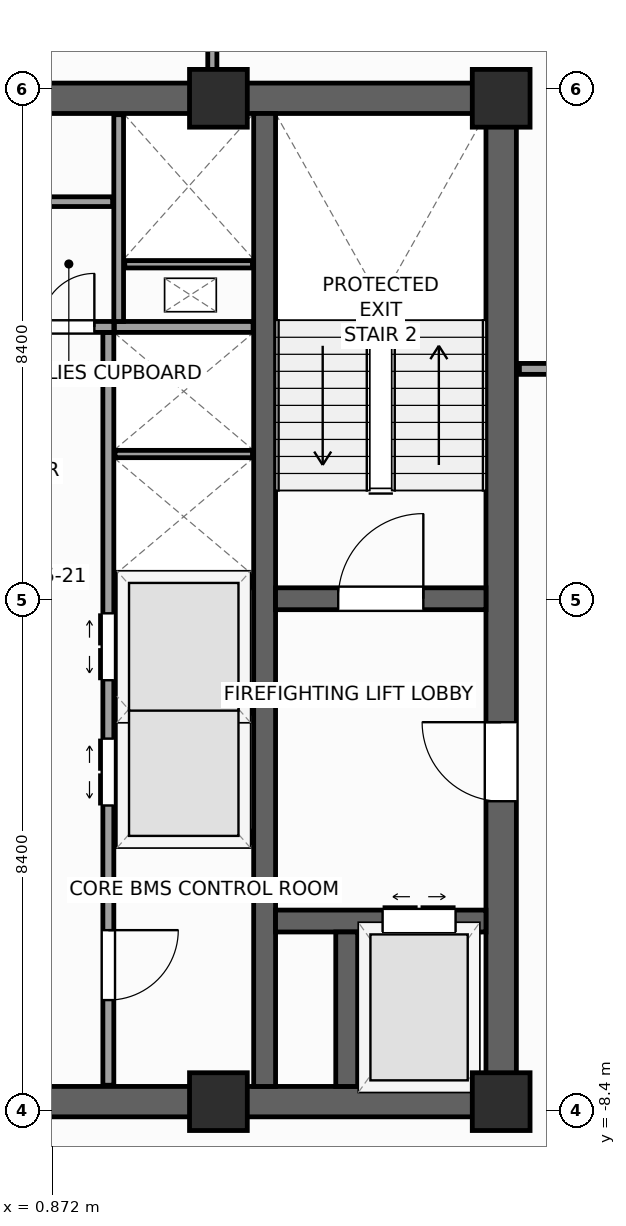
"""IFC4 building model, lengths in metres.
Left out: names, types, materials, properties, quantities, classifications, styles, units other than length and angle.
Written with IfcOpenShell. Run it as: python <this file> out.ifc"""

import sys

from ifc_helpers import new_model, si_unit, direction, frame, frame_2d, origin, origin_2d, place, context, subcontext, project, spatial, rectangle, extrude, source, transform, mapped, element, fill, save


model = new_model("IFC4")
c1 = context("Model", 3, precision=1e-05, world=origin(), true_north=direction((0.0, 1.0)))
c2 = subcontext(c1, "Body", "Model", "MODEL_VIEW")
j1 = project(units=[si_unit("LENGTHUNIT", "METRE"), si_unit("PLANEANGLEUNIT", "RADIAN")], contexts=[c1])
p1 = place(None, origin())
s1 = spatial("IfcSite", under=j1, at=p1, CompositionType="ELEMENT")
p2 = place(p1, origin())
s2 = spatial("IfcBuilding", under=s1, at=p2, CompositionType="ELEMENT")
p3 = place(p2, frame((0.0, 0.0, 225.1)))
s3 = spatial("IfcBuildingStorey", under=s2, at=p3, CompositionType="ELEMENT", Elevation=225.1)
p4 = place(p3, frame((-8.5, -8.25, 0.0), z_axis=(0.0, 0.0, 1.0), x_axis=(1.0, 0.0, 0.0)))
e1 = element("IfcWall", 1, at=p4, inside=s3, PredefinedType="SHEAR", context=c2, shape_type="SweptSolid", body=[
    extrude(rectangle(XDim=17.0, YDim=0.5, at=frame_2d((8.5, 0.0))), origin(), (0.0, 0.0, 1.0), 3.9),
])
p5 = place(p4, frame((7.85, 0.0, 0.0)))
e2 = element("IfcOpeningElement", 2, at=p5, cuts=e1, PredefinedType="OPENING", context=c2, shape_type="SweptSolid", body=[
    extrude(rectangle(XDim=1.3, YDim=2.2, at=frame_2d((0.65, 1.1))), frame((0.0, 0.26, 0.0), z_axis=(0.0, -1.0, 0.0), x_axis=(1.0, 0.0, 0.0)), (0.0, 0.0, 1.0), 0.52),
])
p6 = place(p3, frame((-8.5, 8.25, 0.0), z_axis=(0.0, 0.0, 1.0), x_axis=(1.0, 0.0, 0.0)))
e3 = element("IfcWall", 3, at=p6, inside=s3, PredefinedType="SHEAR", context=c2, shape_type="SweptSolid", body=[
    extrude(rectangle(XDim=17.0, YDim=0.5, at=frame_2d((8.5, 0.0))), origin(), (0.0, 0.0, 1.0), 3.9),
])
p7 = place(p3, frame((8.25, -8.0, 0.0), z_axis=(0.0, 0.0, 1.0), x_axis=(0.0, 1.0, 0.0)))
e4 = element("IfcWall", 4, at=p7, inside=s3, PredefinedType="SHEAR", context=c2, shape_type="SweptSolid", body=[
    extrude(rectangle(XDim=16.0, YDim=0.5, at=frame_2d((8.0, 0.0))), origin(), (0.0, 0.0, 1.0), 3.9),
])
p8 = place(p7, frame((4.69, 0.0, 0.0)))
e5 = element("IfcOpeningElement", 5, at=p8, cuts=e4, PredefinedType="OPENING", context=c2, shape_type="SweptSolid", body=[
    extrude(rectangle(XDim=1.3, YDim=2.2, at=frame_2d((0.65, 1.1))), frame((0.0, 0.26, 0.0), z_axis=(0.0, -1.0, 0.0), x_axis=(1.0, 0.0, 0.0)), (0.0, 0.0, 1.0), 0.52),
])
p9 = place(p3, frame((4.36, -8.0, 0.0), z_axis=(0.0, 0.0, 1.0), x_axis=(0.0, 1.0, 0.0)))
e6 = element("IfcWall", 6, at=p9, inside=s3, PredefinedType="SHEAR", context=c2, shape_type="SweptSolid", body=[
    extrude(rectangle(XDim=16.0, YDim=0.36, at=frame_2d((8.0, 0.0))), origin(), (0.0, 0.0, 1.0), 3.9),
])
p10 = place(p3, frame((4.54, 0.02, 0.0), z_axis=(0.0, 0.0, 1.0), x_axis=(1.0, 0.0, 0.0)))
e7 = element("IfcWall", 7, at=p10, inside=s3, PredefinedType="SHEAR", context=c2, shape_type="SweptSolid", body=[
    extrude(rectangle(XDim=3.46, YDim=0.36, at=frame_2d((1.73, 0.0))), origin(), (0.0, 0.0, 1.0), 3.9),
])
p11 = place(p10, frame((1.03, 0.0, 0.0)))
e8 = element("IfcOpeningElement", 8, at=p11, cuts=e7, PredefinedType="OPENING", context=c2, shape_type="SweptSolid", body=[
    extrude(rectangle(XDim=1.4, YDim=2.2, at=frame_2d((0.7, 1.1))), frame((0.0, 0.19, 0.0), z_axis=(0.0, -1.0, 0.0), x_axis=(1.0, 0.0, 0.0)), (0.0, 0.0, 1.0), 0.38),
])
p12 = place(p3, frame((4.54, -5.28, 0.0), z_axis=(0.0, 0.0, 1.0), x_axis=(1.0, 0.0, 0.0)))
e9 = element("IfcWall", 9, at=p12, inside=s3, PredefinedType="SHEAR", context=c2, shape_type="SweptSolid", body=[
    extrude(rectangle(XDim=3.46, YDim=0.36, at=frame_2d((1.73, 0.0))), origin(), (0.0, 0.0, 1.0), 3.9),
])
p13 = place(p12, frame((1.76, 0.0, 0.0)))
e10 = element("IfcOpeningElement", 10, at=p13, cuts=e9, PredefinedType="OPENING", context=c2, shape_type="SweptSolid", body=[
    extrude(rectangle(XDim=1.2, YDim=2.25, at=frame_2d((0.6, 1.125))), frame((0.0, 0.19, 0.0), z_axis=(0.0, -1.0, 0.0), x_axis=(1.0, 0.0, 0.0)), (0.0, 0.0, 1.0), 0.38),
])
p14 = place(p3, frame((5.71, -8.0, 0.0), z_axis=(0.0, 0.0, 1.0), x_axis=(0.0, 1.0, 0.0)))
e11 = element("IfcWall", 11, at=p14, inside=s3, PredefinedType="SHEAR", context=c2, shape_type="SweptSolid", body=[
    extrude(rectangle(XDim=2.54, YDim=0.36, at=frame_2d((1.27, 0.0))), origin(), (0.0, 0.0, 1.0), 3.9),
])
m1 = source(origin(), c2, "Body", "SweptSolid", [
    extrude(rectangle(XDim=0.95, YDim=0.95, at=origin_2d()), origin(), (0.0, 0.0, 1.0), 3.9),
])
for number, where, z_axis, x_axis in (
    (12, (8.25, -8.25, 0.0), (0.0, 0.0, 1.0), (1.0, 0.0, 0.0)),
    (13, (8.25, 8.25, 0.0), (0.0, 0.0, 1.0), (1.0, 0.0, 0.0)),
    (14, (3.6, -8.25, 0.0), (0.0, 0.0, 1.0), (1.0, 0.0, 0.0)),
    (15, (3.6, 8.25, 0.0), (0.0, 0.0, 1.0), (1.0, 0.0, 0.0)),
):
    element("IfcColumn", number, at=place(p3, frame(where, z_axis=z_axis, x_axis=x_axis)), inside=s3, PredefinedType="PILASTER", context=c2, shape_type="MappedRepresentation", body=[
        mapped(m1, transform((0.0, 0.0, 0.0), scale=1.0)),
    ])
p15 = place(p3, frame((6.733, -29.154, 0.0), z_axis=(0.0, 0.0, 1.0), x_axis=(0.629325378072, 0.77714192302, 0.0)))
e16 = element("IfcWall", 16, at=p15, inside=s3, PredefinedType="STANDARD", context=c2, shape_type="SweptSolid", body=[
    extrude(rectangle(XDim=36.84, YDim=0.34, at=frame_2d((18.42, 0.0))), origin(), (0.0, 0.0, 1.0), 2.96),
])
p16 = place(p15, frame((12.295, 0.0, 0.0)))
e17 = element("IfcOpeningElement", 17, at=p16, cuts=e16, PredefinedType="OPENING", context=c2, shape_type="SweptSolid", body=[
    extrude(rectangle(XDim=1.05, YDim=2.25, at=frame_2d((0.525, 1.125))), frame((0.0, 0.18, 0.0), z_axis=(0.0, -1.0, 0.0), x_axis=(1.0, 0.0, 0.0)), (0.0, 0.0, 1.0), 0.36),
])
p17 = place(p15, frame((3.721, 0.0, 0.48)))
e18 = element("IfcOpeningElement", 18, at=p17, cuts=e16, PredefinedType="OPENING", context=c2, shape_type="SweptSolid", body=[
    extrude(rectangle(XDim=1.4, YDim=2.4, at=frame_2d((0.7, 1.2))), frame((0.0, 0.18, 0.0), z_axis=(0.0, -1.0, 0.0), x_axis=(1.0, 0.0, 0.0)), (0.0, 0.0, 1.0), 0.36),
])
p18 = place(p15, frame((16.058, 0.0, 0.58)))
e19 = element("IfcOpeningElement", 19, at=p18, cuts=e16, PredefinedType="OPENING", context=c2, shape_type="SweptSolid", body=[
    extrude(rectangle(XDim=1.75, YDim=2.3, at=frame_2d((0.875, 1.15))), frame((0.0, 0.18, 0.0), z_axis=(0.0, -1.0, 0.0), x_axis=(1.0, 0.0, 0.0)), (0.0, 0.0, 1.0), 0.36),
])
p19 = place(p15, frame((24.176, 0.0, 0.58)))
e20 = element("IfcOpeningElement", 20, at=p19, cuts=e16, PredefinedType="OPENING", context=c2, shape_type="SweptSolid", body=[
    extrude(rectangle(XDim=1.75, YDim=2.3, at=frame_2d((0.875, 1.15))), frame((0.0, 0.18, 0.0), z_axis=(0.0, -1.0, 0.0), x_axis=(1.0, 0.0, 0.0)), (0.0, 0.0, 1.0), 0.36),
])
p20 = place(p15, frame((30.982, 0.0, 0.48)))
e21 = element("IfcOpeningElement", 21, at=p20, cuts=e16, PredefinedType="OPENING", context=c2, shape_type="SweptSolid", body=[
    extrude(rectangle(XDim=1.4, YDim=2.4, at=frame_2d((0.7, 1.2))), frame((0.0, 0.18, 0.0), z_axis=(0.0, -1.0, 0.0), x_axis=(1.0, 0.0, 0.0)), (0.0, 0.0, 1.0), 0.36),
])
p21 = place(p3, frame((29.154, 6.733, 0.0), z_axis=(0.0, 0.0, 1.0), x_axis=(-0.77714192302, 0.629325378072, 0.0)))
e22 = element("IfcWall", 22, at=p21, inside=s3, PredefinedType="STANDARD", context=c2, shape_type="SweptSolid", body=[
    extrude(rectangle(XDim=36.84, YDim=0.34, at=frame_2d((18.42, 0.0))), origin(), (0.0, 0.0, 1.0), 2.96),
])
p22 = place(p21, frame((3.721, 0.0, 0.48)))
e23 = element("IfcOpeningElement", 23, at=p22, cuts=e22, PredefinedType="OPENING", context=c2, shape_type="SweptSolid", body=[
    extrude(rectangle(XDim=1.4, YDim=2.4, at=frame_2d((0.7, 1.2))), frame((0.0, 0.18, 0.0), z_axis=(0.0, -1.0, 0.0), x_axis=(1.0, 0.0, 0.0)), (0.0, 0.0, 1.0), 0.36),
])
p23 = place(p21, frame((9.809, 0.0, 0.58)))
e24 = element("IfcOpeningElement", 24, at=p23, cuts=e22, PredefinedType="OPENING", context=c2, shape_type="SweptSolid", body=[
    extrude(rectangle(XDim=1.75, YDim=2.3, at=frame_2d((0.875, 1.15))), frame((0.0, 0.18, 0.0), z_axis=(0.0, -1.0, 0.0), x_axis=(1.0, 0.0, 0.0)), (0.0, 0.0, 1.0), 0.36),
])
p24 = place(p21, frame((16.058, 0.0, 0.58)))
e25 = element("IfcOpeningElement", 25, at=p24, cuts=e22, PredefinedType="OPENING", context=c2, shape_type="SweptSolid", body=[
    extrude(rectangle(XDim=1.75, YDim=2.3, at=frame_2d((0.875, 1.15))), frame((0.0, 0.18, 0.0), z_axis=(0.0, -1.0, 0.0), x_axis=(1.0, 0.0, 0.0)), (0.0, 0.0, 1.0), 0.36),
])
p25 = place(p21, frame((24.176, 0.0, 0.58)))
e26 = element("IfcOpeningElement", 26, at=p25, cuts=e22, PredefinedType="OPENING", context=c2, shape_type="SweptSolid", body=[
    extrude(rectangle(XDim=1.75, YDim=2.3, at=frame_2d((0.875, 1.15))), frame((0.0, 0.18, 0.0), z_axis=(0.0, -1.0, 0.0), x_axis=(1.0, 0.0, 0.0)), (0.0, 0.0, 1.0), 0.36),
])
p26 = place(p21, frame((30.982, 0.0, 0.48)))
e27 = element("IfcOpeningElement", 27, at=p26, cuts=e22, PredefinedType="OPENING", context=c2, shape_type="SweptSolid", body=[
    extrude(rectangle(XDim=1.4, YDim=2.4, at=frame_2d((0.7, 1.2))), frame((0.0, 0.18, 0.0), z_axis=(0.0, -1.0, 0.0), x_axis=(1.0, 0.0, 0.0)), (0.0, 0.0, 1.0), 0.36),
])
p27 = place(p3, frame((1.79, -7.98, 0.0), z_axis=(0.0, 0.0, 1.0), x_axis=(0.0, 1.0, 0.0)))
e28 = element("IfcWall", 28, at=p27, inside=s3, PredefinedType="PARTITIONING", context=c2, shape_type="SweptSolid", body=[
    extrude(rectangle(XDim=12.38, YDim=0.18, at=frame_2d((6.19, 0.0))), origin(), (0.0, 0.0, 1.0), 3.66),
])
p28 = place(p27, frame((4.6, 0.0, 0.0)))
e29 = element("IfcOpeningElement", 29, at=p28, cuts=e28, PredefinedType="OPENING", context=c2, shape_type="SweptSolid", body=[
    extrude(rectangle(XDim=1.1, YDim=2.2, at=frame_2d((0.55, 1.1))), frame((0.0, 0.1, 0.0), z_axis=(0.0, -1.0, 0.0), x_axis=(1.0, 0.0, 0.0)), (0.0, 0.0, 1.0), 0.2),
])
p29 = place(p27, frame((6.66, 0.0, 0.0)))
e30 = element("IfcOpeningElement", 30, at=p29, cuts=e28, PredefinedType="OPENING", context=c2, shape_type="SweptSolid", body=[
    extrude(rectangle(XDim=1.1, YDim=2.2, at=frame_2d((0.55, 1.1))), frame((0.0, 0.1, 0.0), z_axis=(0.0, -1.0, 0.0), x_axis=(1.0, 0.0, 0.0)), (0.0, 0.0, 1.0), 0.2),
])
p30 = place(p27, frame((1.4, 0.0, 0.0)))
e31 = element("IfcOpeningElement", 31, at=p30, cuts=e28, PredefinedType="OPENING", context=c2, shape_type="SweptSolid", body=[
    extrude(rectangle(XDim=1.15, YDim=2.25, at=frame_2d((0.575, 1.125))), frame((0.0, 0.1, 0.0), z_axis=(0.0, -1.0, 0.0), x_axis=(1.0, 0.0, 0.0)), (0.0, 0.0, 1.0), 0.2),
])
p31 = place(p3, frame((-1.88, 4.49, 0.0), z_axis=(0.0, 0.0, 1.0), x_axis=(1.0, 0.0, 0.0)))
e32 = element("IfcWall", 32, at=p31, inside=s3, PredefinedType="PARTITIONING", context=c2, shape_type="SweptSolid", body=[
    extrude(rectangle(XDim=3.76, YDim=0.18, at=frame_2d((1.88, 0.0))), origin(), (0.0, 0.0, 1.0), 3.66),
])
p32 = place(p31, frame((0.55, 0.0, 0.0)))
e33 = element("IfcOpeningElement", 33, at=p32, cuts=e32, PredefinedType="OPENING", context=c2, shape_type="SweptSolid", body=[
    extrude(rectangle(XDim=0.95, YDim=2.1, at=frame_2d((0.475, 1.05))), frame((0.0, 0.1, 0.0), z_axis=(0.0, -1.0, 0.0), x_axis=(1.0, 0.0, 0.0)), (0.0, 0.0, 1.0), 0.2),
])
p33 = place(p31, frame((2.56, 0.0, 0.0)))
e34 = element("IfcOpeningElement", 34, at=p33, cuts=e32, PredefinedType="OPENING", context=c2, shape_type="SweptSolid", body=[
    extrude(rectangle(XDim=0.88, YDim=2.1, at=frame_2d((0.44, 1.05))), frame((0.0, 0.1, 0.0), z_axis=(0.0, -1.0, 0.0), x_axis=(1.0, 0.0, 0.0)), (0.0, 0.0, 1.0), 0.2),
])
for number, where, z_axis, x_axis in (
    (35, (1.89, -3.9, 0.0), (0.0, 0.0, 1.0), (1.0, 0.0, 0.0)),
    (36, (1.89, 0.3, 0.0), (0.0, 0.0, 1.0), (1.0, 0.0, 0.0)),
    (37, (1.89, 4.49, 0.0), (0.0, 0.0, 1.0), (1.0, 0.0, 0.0)),
):
    element("IfcWall", number, at=place(p3, frame(where, z_axis=z_axis, x_axis=x_axis)), inside=s3, PredefinedType="PARTITIONING", context=c2, shape_type="SweptSolid", body=[
        extrude(rectangle(XDim=2.28, YDim=0.18, at=frame_2d((1.14, 0.0))), origin(), (0.0, 0.0, 1.0), 3.66),
    ])
for number, where, z_axis, x_axis in (
    (38, (1.9, -1.8, 0.0), (0.0, 0.0, 1.0), (1.0, 0.0, 0.0)),
    (39, (1.9, 2.4, 0.0), (0.0, 0.0, 1.0), (1.0, 0.0, 0.0)),
):
    element("IfcWall", number, at=place(p3, frame(where, z_axis=z_axis, x_axis=x_axis)), inside=s3, PredefinedType="PARTITIONING", context=c2, shape_type="SweptSolid", body=[
        extrude(rectangle(XDim=2.26, YDim=0.12, at=frame_2d((1.13, 0.0))), origin(), (0.0, 0.0, 1.0), 3.66),
    ])
p34 = place(p3, frame((1.96, 4.58, 0.0), z_axis=(0.0, 0.0, 1.0), x_axis=(0.0, 1.0, 0.0)))
e40 = element("IfcWall", 40, at=p34, inside=s3, PredefinedType="PARTITIONING", context=c2, shape_type="SweptSolid", body=[
    extrude(rectangle(XDim=3.4, YDim=0.16, at=frame_2d((1.7, 0.0))), origin(), (0.0, 0.0, 1.0), 3.66),
])
p35 = place(p3, frame((2.06, 5.52, 0.0), z_axis=(0.0, 0.0, 1.0), x_axis=(1.0, 0.0, 0.0)))
e41 = element("IfcWall", 41, at=p35, inside=s3, PredefinedType="PARTITIONING", context=c2, shape_type="SweptSolid", body=[
    extrude(rectangle(XDim=2.1, YDim=0.12, at=frame_2d((1.05, 0.0))), origin(), (0.0, 0.0, 1.0), 3.66),
])
p36 = place(p3, frame((0.4, 6.55, 0.0), z_axis=(0.0, 0.0, 1.0), x_axis=(1.0, 0.0, 0.0)))
e42 = element("IfcWall", 42, at=p36, inside=s3, PredefinedType="PARTITIONING", context=c2, shape_type="SweptSolid", body=[
    extrude(rectangle(XDim=1.46, YDim=0.16, at=frame_2d((0.73, 0.0))), origin(), (0.0, 0.0, 1.0), 3.66),
])
p37 = place(p3, frame((8.55, 3.8, 0.0), z_axis=(0.0, 0.0, 1.0), x_axis=(1.0, 0.0, 0.0)))
e43 = element("IfcWall", 43, at=p37, inside=s3, PredefinedType="PARTITIONING", context=c2, shape_type="SweptSolid", body=[
    extrude(rectangle(XDim=3.9, YDim=0.18, at=frame_2d((1.95, 0.0))), origin(), (0.0, 0.0, 1.0), 3.66),
])
p38 = place(p37, frame((1.4, 0.0, 0.0)))
e44 = element("IfcOpeningElement", 44, at=p38, cuts=e43, PredefinedType="OPENING", context=c2, shape_type="SweptSolid", body=[
    extrude(rectangle(XDim=1.1, YDim=2.2, at=frame_2d((0.55, 1.1))), frame((0.0, 0.1, 0.0), z_axis=(0.0, -1.0, 0.0), x_axis=(1.0, 0.0, 0.0)), (0.0, 0.0, 1.0), 0.2),
])
p39 = place(p3, frame((3.5, 8.505, 0.0), z_axis=(0.0, 0.0, 1.0), x_axis=(0.0, 1.0, 0.0)))
e45 = element("IfcWall", 45, at=p39, inside=s3, PredefinedType="PARTITIONING", context=c2, shape_type="SweptSolid", body=[
    extrude(rectangle(XDim=18.868, YDim=0.15, at=frame_2d((9.434, 0.0))), origin(), (0.0, 0.0, 1.0), 3.66),
])
m2 = source(origin(), c2, "Body", "SweptSolid", [
    extrude(rectangle(XDim=1.4, YDim=2.2, at=frame_2d((0.7, 1.1))), frame((0.0, 0.025, 0.0), z_axis=(0.0, -1.0, 0.0), x_axis=(1.0, 0.0, 0.0)), (0.0, 0.0, 1.0), 0.05),
])
p40 = place(p11, origin())
e46 = element("IfcDoor", 46, at=p40, inside=s3, OperationType="SINGLE_SWING_RIGHT", PredefinedType="DOOR", context=c2, shape_type="MappedRepresentation", body=[
    mapped(m2, transform((0.0, 0.0, 0.0), scale=1.0)),
])
fill(e8, e46)
m3 = source(origin(), c2, "Body", "SweptSolid", [
    extrude(rectangle(XDim=1.3, YDim=2.2, at=frame_2d((0.65, 1.1))), frame((0.0, 0.025, 0.0), z_axis=(0.0, -1.0, 0.0), x_axis=(1.0, 0.0, 0.0)), (0.0, 0.0, 1.0), 0.05),
])
p41 = place(p8, origin())
e47 = element("IfcDoor", 47, at=p41, inside=s3, OperationType="SINGLE_SWING_RIGHT", PredefinedType="DOOR", context=c2, shape_type="MappedRepresentation", body=[
    mapped(m3, transform((0.0, 0.0, 0.0), scale=1.0)),
])
fill(e5, e47)
m4 = source(origin(), c2, "Body", "SweptSolid", [
    extrude(rectangle(XDim=1.2, YDim=2.25, at=frame_2d((0.6, 1.125))), frame((0.0, 0.025, 0.0), z_axis=(0.0, -1.0, 0.0), x_axis=(1.0, 0.0, 0.0)), (0.0, 0.0, 1.0), 0.05),
])
p42 = place(p13, origin())
e48 = element("IfcDoor", 48, at=p42, inside=s3, OperationType="DOUBLE_DOOR_SLIDING", PredefinedType="DOOR", context=c2, shape_type="MappedRepresentation", body=[
    mapped(m4, transform((0.0, 0.0, 0.0), scale=1.0)),
])
fill(e10, e48)
m5 = source(origin(), c2, "Body", "SweptSolid", [
    extrude(rectangle(XDim=1.1, YDim=2.2, at=frame_2d((0.55, 1.1))), frame((0.0, 0.025, 0.0), z_axis=(0.0, -1.0, 0.0), x_axis=(1.0, 0.0, 0.0)), (0.0, 0.0, 1.0), 0.05),
])
p43 = place(p28, origin())
e49 = element("IfcDoor", 49, at=p43, inside=s3, OperationType="DOUBLE_DOOR_SLIDING", PredefinedType="DOOR", context=c2, shape_type="MappedRepresentation", body=[
    mapped(m5, transform((0.0, 0.0, 0.0), scale=1.0)),
])
fill(e29, e49)
p44 = place(p29, origin())
e50 = element("IfcDoor", 50, at=p44, inside=s3, OperationType="DOUBLE_DOOR_SLIDING", PredefinedType="DOOR", context=c2, shape_type="MappedRepresentation", body=[
    mapped(m5, transform((0.0, 0.0, 0.0), scale=1.0)),
])
fill(e30, e50)
m6 = source(origin(), c2, "Body", "SweptSolid", [
    extrude(rectangle(XDim=1.15, YDim=2.25, at=frame_2d((0.575, 1.125))), frame((0.0, 0.025, 0.0), z_axis=(0.0, -1.0, 0.0), x_axis=(1.0, 0.0, 0.0)), (0.0, 0.0, 1.0), 0.05),
])
p45 = place(p30, frame((1.15, 0.0, 0.0), z_axis=(0.0, 0.0, 1.0), x_axis=(-1.0, 0.0, 0.0)))
e51 = element("IfcDoor", 51, at=p45, inside=s3, OperationType="SINGLE_SWING_RIGHT", PredefinedType="DOOR", context=c2, shape_type="MappedRepresentation", body=[
    mapped(m6, transform((0.0, 0.0, 0.0), scale=1.0)),
])
fill(e31, e51)
m7 = source(origin(), c2, "Body", "SweptSolid", [
    extrude(rectangle(XDim=0.88, YDim=2.1, at=frame_2d((0.44, 1.05))), frame((0.0, 0.025, 0.0), z_axis=(0.0, -1.0, 0.0), x_axis=(1.0, 0.0, 0.0)), (0.0, 0.0, 1.0), 0.05),
])
p46 = place(p33, origin())
e52 = element("IfcDoor", 52, at=p46, inside=s3, OperationType="SINGLE_SWING_RIGHT", PredefinedType="DOOR", context=c2, shape_type="MappedRepresentation", body=[
    mapped(m7, transform((0.0, 0.0, 0.0), scale=1.0)),
])
fill(e34, e52)
save(model, sys.argv[1])
